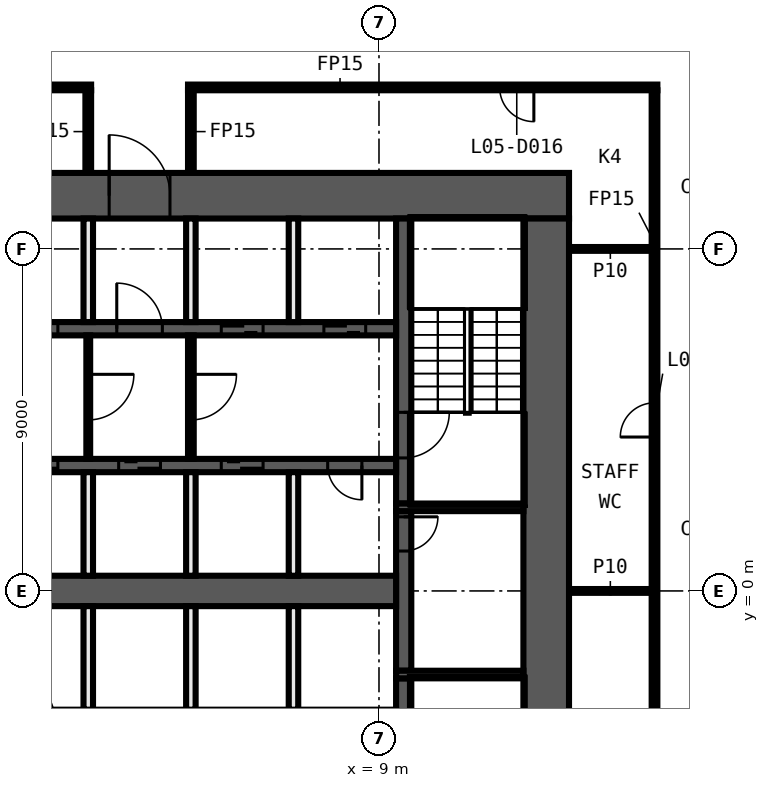
"""IFC4 building model, lengths in metres.
Left out: names, types, materials, properties, quantities, classifications, styles, units other than length and angle.
Written with IfcOpenShell. Run it as: python <this file> out.ifc"""

import sys

from ifc_helpers import new_model, si_unit, direction, frame, frame_2d, origin, place, context, subcontext, project, spatial, rectangle, extrude, element, fill, save


model = new_model("IFC4")
c1 = context("Model", 3, precision=1e-05, world=origin(), true_north=direction((0.0, 1.0)))
c2 = subcontext(c1, "Body", "Model", "MODEL_VIEW")
j1 = project(units=[si_unit("LENGTHUNIT", "METRE"), si_unit("PLANEANGLEUNIT", "RADIAN")], contexts=[c1])
p1 = place(None, origin())
s1 = spatial("IfcSite", under=j1, at=p1, CompositionType="ELEMENT")
p2 = place(p1, origin())
s2 = spatial("IfcBuilding", under=s1, at=p2, CompositionType="ELEMENT")
p3 = place(p2, frame((0.0, 0.0, 38.0)))
s3 = spatial("IfcBuildingStorey", under=s2, at=p3, CompositionType="ELEMENT", Elevation=38.0)
for number, where, z_axis, x_axis in (
    (1, (14.0, 0.0, 0.0), (0.0, 0.0, 1.0), (1.0, 0.0, 0.0)),
    (2, (14.0, 9.0, 0.0), (0.0, 0.0, 1.0), (1.0, 0.0, 0.0)),
):
    element("IfcWall", number, at=place(p3, frame(where, z_axis=z_axis, x_axis=x_axis)), inside=s3, PredefinedType="PARTITIONING", context=c2, shape_type="SweptSolid", body=[
        extrude(rectangle(XDim=2.175, YDim=0.1, at=frame_2d((1.087, 0.0))), origin(), (0.0, 0.0, 1.0), 5.6),
    ])
p4 = place(p3, frame((1.425, 13.25, 0.0), z_axis=(0.0, 0.0, 1.0), x_axis=(-1.0, 0.0, 0.0)))
e3 = element("IfcWall", 3, at=p4, inside=s3, PredefinedType="PARTITIONING", context=c2, shape_type="SweptSolid", body=[
    extrude(rectangle(XDim=17.75, YDim=0.15, at=frame_2d((8.875, 0.0))), origin(), (0.0, 0.0, 1.0), 5.6),
])
p5 = place(p4, frame((5.475, 0.0, 0.0)))
e4 = element("IfcOpeningElement", 4, at=p5, cuts=e3, PredefinedType="OPENING", context=c2, shape_type="SweptSolid", body=[
    extrude(rectangle(XDim=0.9, YDim=2.1, at=frame_2d((0.45, 1.05))), frame((0.0, 0.085, 0.0), z_axis=(0.0, -1.0, 0.0), x_axis=(1.0, 0.0, 0.0)), (0.0, 0.0, 1.0), 0.17),
])
p6 = place(p4, frame((13.6, 0.0, 0.0)))
e5 = element("IfcOpeningElement", 5, at=p6, cuts=e3, PredefinedType="OPENING", context=c2, shape_type="SweptSolid", body=[
    extrude(rectangle(XDim=0.9, YDim=2.1, at=frame_2d((0.45, 1.05))), frame((0.0, 0.085, 0.0), z_axis=(0.0, -1.0, 0.0), x_axis=(1.0, 0.0, 0.0)), (0.0, 0.0, 1.0), 0.17),
])
p7 = place(p3, frame((16.325, 13.25, 0.0), z_axis=(0.0, 0.0, 1.0), x_axis=(-1.0, 0.0, 0.0)))
e6 = element("IfcWall", 6, at=p7, inside=s3, PredefinedType="PARTITIONING", context=c2, shape_type="SweptSolid", body=[
    extrude(rectangle(XDim=12.35, YDim=0.15, at=frame_2d((6.175, 0.0))), origin(), (0.0, 0.0, 1.0), 5.6),
])
p8 = place(p7, frame((3.25, 0.0, 0.0)))
e7 = element("IfcOpeningElement", 7, at=p8, cuts=e6, PredefinedType="OPENING", context=c2, shape_type="SweptSolid", body=[
    extrude(rectangle(XDim=0.9, YDim=2.1, at=frame_2d((0.45, 1.05))), frame((0.0, 0.085, 0.0), z_axis=(0.0, -1.0, 0.0), x_axis=(1.0, 0.0, 0.0)), (0.0, 0.0, 1.0), 0.17),
])
p9 = place(p3, frame((16.25, -13.175, 0.0), z_axis=(0.0, 0.0, 1.0), x_axis=(0.0, 1.0, 0.0)))
e8 = element("IfcWall", 8, at=p9, inside=s3, PredefinedType="PARTITIONING", context=c2, shape_type="SweptSolid", body=[
    extrude(rectangle(XDim=26.35, YDim=0.15, at=frame_2d((13.175, 0.0))), origin(), (0.0, 0.0, 1.0), 5.6),
])
p10 = place(p9, frame((8.225, 0.0, 0.0)))
e9 = element("IfcOpeningElement", 9, at=p10, cuts=e8, PredefinedType="OPENING", context=c2, shape_type="SweptSolid", body=[
    extrude(rectangle(XDim=0.9, YDim=2.1, at=frame_2d((0.45, 1.05))), frame((0.0, 0.085, 0.0), z_axis=(0.0, -1.0, 0.0), x_axis=(1.0, 0.0, 0.0)), (0.0, 0.0, 1.0), 0.17),
])
p11 = place(p9, frame((17.225, 0.0, 0.0)))
e10 = element("IfcOpeningElement", 10, at=p11, cuts=e8, PredefinedType="OPENING", context=c2, shape_type="SweptSolid", body=[
    extrude(rectangle(XDim=0.9, YDim=2.1, at=frame_2d((0.45, 1.05))), frame((0.0, 0.085, 0.0), z_axis=(0.0, -1.0, 0.0), x_axis=(1.0, 0.0, 0.0)), (0.0, 0.0, 1.0), 0.17),
])
for number, where, z_axis, x_axis in (
    (11, (4.05, 11.0, 0.0), (0.0, 0.0, 1.0), (0.0, 1.0, 0.0)),
    (12, (1.35, 11.0, 0.0), (0.0, 0.0, 1.0), (0.0, 1.0, 0.0)),
):
    element("IfcWall", number, at=place(p3, frame(where, z_axis=z_axis, x_axis=x_axis)), inside=s3, PredefinedType="PARTITIONING", context=c2, shape_type="SweptSolid", body=[
        extrude(rectangle(XDim=2.175, YDim=0.15, at=frame_2d((1.087, 0.0))), origin(), (0.0, 0.0, 1.0), 5.6),
    ])
p12 = place(p3, frame((-14.0, 10.4, 0.0), z_axis=(0.0, 0.0, 1.0), x_axis=(1.0, 0.0, 0.0)))
e13 = element("IfcWall", 13, at=p12, inside=s3, PredefinedType="SHEAR", context=c2, shape_type="SweptSolid", body=[
    extrude(rectangle(XDim=28.0, YDim=1.2, at=frame_2d((14.0, 0.0))), origin(), (0.0, 0.0, 1.0), 5.6),
])
p13 = place(p12, frame((15.9, 0.0, 0.0)))
e14 = element("IfcOpeningElement", 14, at=p13, cuts=e13, PredefinedType="OPENING", context=c2, shape_type="SweptSolid", body=[
    extrude(rectangle(XDim=1.6, YDim=2.1, at=frame_2d((0.8, 1.05))), frame((0.0, 0.61, 0.0), z_axis=(0.0, -1.0, 0.0), x_axis=(1.0, 0.0, 0.0)), (0.0, 0.0, 1.0), 1.22),
])
p14 = place(p3, frame((13.4, 9.8, 0.0), z_axis=(0.0, 0.0, 1.0), x_axis=(0.0, -1.0, 0.0)))
e15 = element("IfcWall", 15, at=p14, inside=s3, PredefinedType="SHEAR", context=c2, shape_type="SweptSolid", body=[
    extrude(rectangle(XDim=19.6, YDim=1.2, at=frame_2d((9.8, 0.0))), origin(), (0.0, 0.0, 1.0), 5.6),
])
p15 = place(p3, frame((9.65, -2.3, 0.0), z_axis=(0.0, 0.0, 1.0), x_axis=(0.0, -1.0, 0.0)))
e16 = element("IfcWall", 16, at=p15, inside=s3, PredefinedType="SHEAR", context=c2, shape_type="SweptSolid", body=[
    extrude(rectangle(XDim=7.5, YDim=0.4, at=frame_2d((3.75, 0.0))), origin(), (0.0, 0.0, 1.0), 5.6),
])
p16 = place(p15, frame((1.2, 0.0, 0.0)))
e17 = element("IfcOpeningElement", 17, at=p16, cuts=e16, PredefinedType="OPENING", context=c2, shape_type="SweptSolid", body=[
    extrude(rectangle(XDim=1.2, YDim=2.1, at=frame_2d((0.6, 1.05))), frame((0.0, 0.21, 0.0), z_axis=(0.0, -1.0, 0.0), x_axis=(1.0, 0.0, 0.0)), (0.0, 0.0, 1.0), 0.42),
])
p17 = place(p3, frame((9.65, 2.1, 0.0), z_axis=(0.0, 0.0, 1.0), x_axis=(0.0, -1.0, 0.0)))
e18 = element("IfcWall", 18, at=p17, inside=s3, PredefinedType="SHEAR", context=c2, shape_type="SweptSolid", body=[
    extrude(rectangle(XDim=4.2, YDim=0.4, at=frame_2d((2.1, 0.0))), origin(), (0.0, 0.0, 1.0), 5.6),
])
p18 = place(p17, frame((0.15, 0.0, 0.0)))
e19 = element("IfcOpeningElement", 19, at=p18, cuts=e18, PredefinedType="OPENING", context=c2, shape_type="SweptSolid", body=[
    extrude(rectangle(XDim=0.9, YDim=2.1, at=frame_2d((0.45, 1.05))), frame((0.0, 0.21, 0.0), z_axis=(0.0, -1.0, 0.0), x_axis=(1.0, 0.0, 0.0)), (0.0, 0.0, 1.0), 0.42),
])
p19 = place(p3, frame((9.65, 9.8, 0.0), z_axis=(0.0, 0.0, 1.0), x_axis=(0.0, -1.0, 0.0)))
e20 = element("IfcWall", 20, at=p19, inside=s3, PredefinedType="SHEAR", context=c2, shape_type="SweptSolid", body=[
    extrude(rectangle(XDim=7.5, YDim=0.4, at=frame_2d((3.75, 0.0))), origin(), (0.0, 0.0, 1.0), 5.6),
])
p20 = place(p19, frame((5.1, 0.0, 0.0)))
e21 = element("IfcOpeningElement", 21, at=p20, cuts=e20, PredefinedType="OPENING", context=c2, shape_type="SweptSolid", body=[
    extrude(rectangle(XDim=1.2, YDim=2.1, at=frame_2d((0.6, 1.05))), frame((0.0, 0.21, 0.0), z_axis=(0.0, -1.0, 0.0), x_axis=(1.0, 0.0, 0.0)), (0.0, 0.0, 1.0), 0.42),
])
for number, where, z_axis, x_axis in (
    (22, (9.45, 2.2, 0.0), (0.0, 0.0, 1.0), (1.0, 0.0, 0.0)),
    (23, (9.45, -2.2, 0.0), (0.0, 0.0, 1.0), (1.0, 0.0, 0.0)),
):
    element("IfcWall", number, at=place(p3, frame(where, z_axis=z_axis, x_axis=x_axis)), inside=s3, PredefinedType="SHEAR", context=c2, shape_type="SweptSolid", body=[
        extrude(rectangle(XDim=3.35, YDim=0.2, at=frame_2d((1.675, 0.0))), origin(), (0.0, 0.0, 1.0), 5.6),
    ])
p21 = place(p3, frame((-9.45, 6.9, 0.0), z_axis=(0.0, 0.0, 1.0), x_axis=(1.0, 0.0, 0.0)))
e24 = element("IfcWall", 24, at=p21, inside=s3, PredefinedType="SHEAR", context=c2, shape_type="SweptSolid", body=[
    extrude(rectangle(XDim=18.9, YDim=0.35, at=frame_2d((9.45, 0.0))), origin(), (0.0, 0.0, 1.0), 5.6),
])
p22 = place(p21, frame((0.8, 0.0, 0.0)))
e25 = element("IfcOpeningElement", 25, at=p22, cuts=e24, PredefinedType="OPENING", context=c2, shape_type="SweptSolid", body=[
    extrude(rectangle(XDim=1.1, YDim=2.1, at=frame_2d((0.55, 1.05))), frame((0.0, 0.185, 0.0), z_axis=(0.0, -1.0, 0.0), x_axis=(1.0, 0.0, 0.0)), (0.0, 0.0, 1.0), 0.37),
])
p23 = place(p21, frame((3.5, 0.0, 0.0)))
e26 = element("IfcOpeningElement", 26, at=p23, cuts=e24, PredefinedType="OPENING", context=c2, shape_type="SweptSolid", body=[
    extrude(rectangle(XDim=1.1, YDim=2.1, at=frame_2d((0.55, 1.05))), frame((0.0, 0.185, 0.0), z_axis=(0.0, -1.0, 0.0), x_axis=(1.0, 0.0, 0.0)), (0.0, 0.0, 1.0), 0.37),
])
p24 = place(p21, frame((6.2, 0.0, 0.0)))
e27 = element("IfcOpeningElement", 27, at=p24, cuts=e24, PredefinedType="OPENING", context=c2, shape_type="SweptSolid", body=[
    extrude(rectangle(XDim=1.1, YDim=2.1, at=frame_2d((0.55, 1.05))), frame((0.0, 0.185, 0.0), z_axis=(0.0, -1.0, 0.0), x_axis=(1.0, 0.0, 0.0)), (0.0, 0.0, 1.0), 0.37),
])
p25 = place(p21, frame((8.9, 0.0, 0.0)))
e28 = element("IfcOpeningElement", 28, at=p25, cuts=e24, PredefinedType="OPENING", context=c2, shape_type="SweptSolid", body=[
    extrude(rectangle(XDim=1.1, YDim=2.1, at=frame_2d((0.55, 1.05))), frame((0.0, 0.185, 0.0), z_axis=(0.0, -1.0, 0.0), x_axis=(1.0, 0.0, 0.0)), (0.0, 0.0, 1.0), 0.37),
])
p26 = place(p21, frame((11.55, 0.0, 0.0)))
e29 = element("IfcOpeningElement", 29, at=p26, cuts=e24, PredefinedType="OPENING", context=c2, shape_type="SweptSolid", body=[
    extrude(rectangle(XDim=1.2, YDim=2.1, at=frame_2d((0.6, 1.05))), frame((0.0, 0.185, 0.0), z_axis=(0.0, -1.0, 0.0), x_axis=(1.0, 0.0, 0.0)), (0.0, 0.0, 1.0), 0.37),
])
p27 = place(p21, frame((14.3, 0.0, 0.0)))
e30 = element("IfcOpeningElement", 30, at=p27, cuts=e24, PredefinedType="OPENING", context=c2, shape_type="SweptSolid", body=[
    extrude(rectangle(XDim=1.1, YDim=2.1, at=frame_2d((0.55, 1.05))), frame((0.0, 0.185, 0.0), z_axis=(0.0, -1.0, 0.0), x_axis=(1.0, 0.0, 0.0)), (0.0, 0.0, 1.0), 0.37),
])
p28 = place(p21, frame((17.0, 0.0, 0.0)))
e31 = element("IfcOpeningElement", 31, at=p28, cuts=e24, PredefinedType="OPENING", context=c2, shape_type="SweptSolid", body=[
    extrude(rectangle(XDim=1.1, YDim=2.1, at=frame_2d((0.55, 1.05))), frame((0.0, 0.185, 0.0), z_axis=(0.0, -1.0, 0.0), x_axis=(1.0, 0.0, 0.0)), (0.0, 0.0, 1.0), 0.37),
])
p29 = place(p3, frame((9.45, 3.3, 0.0), z_axis=(0.0, 0.0, 1.0), x_axis=(-1.0, 0.0, 0.0)))
e32 = element("IfcWall", 32, at=p29, inside=s3, PredefinedType="SHEAR", context=c2, shape_type="SweptSolid", body=[
    extrude(rectangle(XDim=18.9, YDim=0.35, at=frame_2d((9.45, 0.0))), origin(), (0.0, 0.0, 1.0), 5.6),
])
p30 = place(p29, frame((17.0, 0.0, 0.0)))
e33 = element("IfcOpeningElement", 33, at=p30, cuts=e32, PredefinedType="OPENING", context=c2, shape_type="SweptSolid", body=[
    extrude(rectangle(XDim=1.1, YDim=2.1, at=frame_2d((0.55, 1.05))), frame((0.0, 0.185, 0.0), z_axis=(0.0, -1.0, 0.0), x_axis=(1.0, 0.0, 0.0)), (0.0, 0.0, 1.0), 0.37),
])
p31 = place(p29, frame((14.3, 0.0, 0.0)))
e34 = element("IfcOpeningElement", 34, at=p31, cuts=e32, PredefinedType="OPENING", context=c2, shape_type="SweptSolid", body=[
    extrude(rectangle(XDim=1.1, YDim=2.1, at=frame_2d((0.55, 1.05))), frame((0.0, 0.185, 0.0), z_axis=(0.0, -1.0, 0.0), x_axis=(1.0, 0.0, 0.0)), (0.0, 0.0, 1.0), 0.37),
])
p32 = place(p29, frame((11.6, 0.0, 0.0)))
e35 = element("IfcOpeningElement", 35, at=p32, cuts=e32, PredefinedType="OPENING", context=c2, shape_type="SweptSolid", body=[
    extrude(rectangle(XDim=1.1, YDim=2.1, at=frame_2d((0.55, 1.05))), frame((0.0, 0.185, 0.0), z_axis=(0.0, -1.0, 0.0), x_axis=(1.0, 0.0, 0.0)), (0.0, 0.0, 1.0), 0.37),
])
p33 = place(p29, frame((8.9, 0.0, 0.0)))
e36 = element("IfcOpeningElement", 36, at=p33, cuts=e32, PredefinedType="OPENING", context=c2, shape_type="SweptSolid", body=[
    extrude(rectangle(XDim=1.1, YDim=2.1, at=frame_2d((0.55, 1.05))), frame((0.0, 0.185, 0.0), z_axis=(0.0, -1.0, 0.0), x_axis=(1.0, 0.0, 0.0)), (0.0, 0.0, 1.0), 0.37),
])
p34 = place(p29, frame((6.2, 0.0, 0.0)))
e37 = element("IfcOpeningElement", 37, at=p34, cuts=e32, PredefinedType="OPENING", context=c2, shape_type="SweptSolid", body=[
    extrude(rectangle(XDim=1.1, YDim=2.1, at=frame_2d((0.55, 1.05))), frame((0.0, 0.185, 0.0), z_axis=(0.0, -1.0, 0.0), x_axis=(1.0, 0.0, 0.0)), (0.0, 0.0, 1.0), 0.37),
])
p35 = place(p29, frame((3.5, 0.0, 0.0)))
e38 = element("IfcOpeningElement", 38, at=p35, cuts=e32, PredefinedType="OPENING", context=c2, shape_type="SweptSolid", body=[
    extrude(rectangle(XDim=1.1, YDim=2.1, at=frame_2d((0.55, 1.05))), frame((0.0, 0.185, 0.0), z_axis=(0.0, -1.0, 0.0), x_axis=(1.0, 0.0, 0.0)), (0.0, 0.0, 1.0), 0.37),
])
p36 = place(p29, frame((0.9, 0.0, 0.0)))
e39 = element("IfcOpeningElement", 39, at=p36, cuts=e32, PredefinedType="OPENING", context=c2, shape_type="SweptSolid", body=[
    extrude(rectangle(XDim=0.9, YDim=2.1, at=frame_2d((0.45, 1.05))), frame((0.0, 0.185, 0.0), z_axis=(0.0, -1.0, 0.0), x_axis=(1.0, 0.0, 0.0)), (0.0, 0.0, 1.0), 0.37),
])
p37 = place(p3, frame((-9.45, 0.0, 0.0), z_axis=(0.0, 0.0, 1.0), x_axis=(1.0, 0.0, 0.0)))
e40 = element("IfcWall", 40, at=p37, inside=s3, PredefinedType="SHEAR", context=c2, shape_type="SweptSolid", body=[
    extrude(rectangle(XDim=18.9, YDim=0.8, at=frame_2d((9.45, 0.0))), origin(), (0.0, 0.0, 1.0), 5.6),
])
for number, where, z_axis, x_axis in (
    (41, (6.75, -3.125, 0.0), (0.0, 0.0, 1.0), (0.0, 1.0, 0.0)),
    (42, (6.75, 0.4, 0.0), (0.0, 0.0, 1.0), (0.0, 1.0, 0.0)),
    (43, (6.75, 7.075, 0.0), (0.0, 0.0, 1.0), (0.0, 1.0, 0.0)),
):
    element("IfcWall", number, at=place(p3, frame(where, z_axis=z_axis, x_axis=x_axis)), inside=s3, PredefinedType="SOLIDWALL", context=c2, shape_type="SweptSolid", body=[
        extrude(rectangle(XDim=2.725, YDim=0.25, at=frame_2d((1.363, 0.0))), origin(), (0.0, 0.0, 1.0), 5.6),
    ])
p38 = place(p3, frame((4.05, 6.725, 0.0), z_axis=(0.0, 0.0, 1.0), x_axis=(0.0, -1.0, 0.0)))
e44 = element("IfcWall", 44, at=p38, inside=s3, PredefinedType="PARTITIONING", context=c2, shape_type="SweptSolid", body=[
    extrude(rectangle(XDim=3.25, YDim=0.15, at=frame_2d((1.625, 0.0))), origin(), (0.0, 0.0, 1.0), 5.6),
])
p39 = place(p38, frame((1.025, 0.0, 0.0)))
e45 = element("IfcOpeningElement", 45, at=p39, cuts=e44, PredefinedType="OPENING", context=c2, shape_type="SweptSolid", body=[
    extrude(rectangle(XDim=1.2, YDim=2.1, at=frame_2d((0.6, 1.05))), frame((0.0, 0.085, 0.0), z_axis=(0.0, -1.0, 0.0), x_axis=(1.0, 0.0, 0.0)), (0.0, 0.0, 1.0), 0.17),
])
for number, where, z_axis, x_axis in (
    (46, (4.05, -3.125, 0.0), (0.0, 0.0, 1.0), (0.0, 1.0, 0.0)),
    (47, (4.05, 0.4, 0.0), (0.0, 0.0, 1.0), (0.0, 1.0, 0.0)),
    (48, (4.05, 7.075, 0.0), (0.0, 0.0, 1.0), (0.0, 1.0, 0.0)),
):
    element("IfcWall", number, at=place(p3, frame(where, z_axis=z_axis, x_axis=x_axis)), inside=s3, PredefinedType="SOLIDWALL", context=c2, shape_type="SweptSolid", body=[
        extrude(rectangle(XDim=2.725, YDim=0.25, at=frame_2d((1.363, 0.0))), origin(), (0.0, 0.0, 1.0), 5.6),
    ])
p40 = place(p3, frame((1.35, 6.725, 0.0), z_axis=(0.0, 0.0, 1.0), x_axis=(0.0, -1.0, 0.0)))
e49 = element("IfcWall", 49, at=p40, inside=s3, PredefinedType="PARTITIONING", context=c2, shape_type="SweptSolid", body=[
    extrude(rectangle(XDim=3.25, YDim=0.1, at=frame_2d((1.625, 0.0))), origin(), (0.0, 0.0, 1.0), 5.6),
])
p41 = place(p40, frame((1.025, 0.0, 0.0)))
e50 = element("IfcOpeningElement", 50, at=p41, cuts=e49, PredefinedType="OPENING", context=c2, shape_type="SweptSolid", body=[
    extrude(rectangle(XDim=1.2, YDim=2.1, at=frame_2d((0.6, 1.05))), frame((0.0, 0.06, 0.0), z_axis=(0.0, -1.0, 0.0), x_axis=(1.0, 0.0, 0.0)), (0.0, 0.0, 1.0), 0.12),
])
for number, where, z_axis, x_axis in (
    (51, (1.35, -3.125, 0.0), (0.0, 0.0, 1.0), (0.0, 1.0, 0.0)),
    (52, (1.35, 0.4, 0.0), (0.0, 0.0, 1.0), (0.0, 1.0, 0.0)),
    (53, (1.35, 7.075, 0.0), (0.0, 0.0, 1.0), (0.0, 1.0, 0.0)),
):
    element("IfcWall", number, at=place(p3, frame(where, z_axis=z_axis, x_axis=x_axis)), inside=s3, PredefinedType="SOLIDWALL", context=c2, shape_type="SweptSolid", body=[
        extrude(rectangle(XDim=2.725, YDim=0.25, at=frame_2d((1.363, 0.0))), origin(), (0.0, 0.0, 1.0), 5.6),
    ])
p42 = place(p11, origin())
e54 = element("IfcDoor", 54, at=p42, inside=s3, OperationType="SINGLE_SWING_RIGHT", PredefinedType="DOOR", context=c2, shape_type="SweptSolid", body=[
    extrude(rectangle(XDim=0.9, YDim=2.1, at=frame_2d((0.45, 1.05))), frame((0.0, 0.025, 0.0), z_axis=(0.0, -1.0, 0.0), x_axis=(1.0, 0.0, 0.0)), (0.0, 0.0, 1.0), 0.05),
])
fill(e10, e54)
p43 = place(p8, origin())
e55 = element("IfcDoor", 55, at=p43, inside=s3, OperationType="SINGLE_SWING_LEFT", PredefinedType="DOOR", context=c2, shape_type="SweptSolid", body=[
    extrude(rectangle(XDim=0.9, YDim=2.1, at=frame_2d((0.45, 1.05))), frame((0.0, 0.025, 0.0), z_axis=(0.0, -1.0, 0.0), x_axis=(1.0, 0.0, 0.0)), (0.0, 0.0, 1.0), 0.05),
])
fill(e7, e55)
p44 = place(p18, origin())
e56 = element("IfcDoor", 56, at=p44, inside=s3, OperationType="SINGLE_SWING_RIGHT", PredefinedType="DOOR", context=c2, shape_type="SweptSolid", body=[
    extrude(rectangle(XDim=0.9, YDim=2.1, at=frame_2d((0.45, 1.05))), frame((0.0, 0.025, 0.0), z_axis=(0.0, -1.0, 0.0), x_axis=(1.0, 0.0, 0.0)), (0.0, 0.0, 1.0), 0.05),
])
fill(e19, e56)
p45 = place(p25, origin())
e57 = element("IfcDoor", 57, at=p45, inside=s3, OperationType="DOUBLE_DOOR_SLIDING", PredefinedType="DOOR", context=c2, shape_type="SweptSolid", body=[
    extrude(rectangle(XDim=1.1, YDim=2.1, at=frame_2d((0.55, 1.05))), frame((0.0, 0.025, 0.0), z_axis=(0.0, -1.0, 0.0), x_axis=(1.0, 0.0, 0.0)), (0.0, 0.0, 1.0), 0.05),
])
fill(e28, e57)
p46 = place(p13, origin())
e58 = element("IfcDoor", 58, at=p46, inside=s3, OperationType="DOUBLE_DOOR_SINGLE_SWING", PredefinedType="DOOR", context=c2, shape_type="SweptSolid", body=[
    extrude(rectangle(XDim=1.6, YDim=2.1, at=frame_2d((0.8, 1.05))), frame((0.0, 0.025, 0.0), z_axis=(0.0, -1.0, 0.0), x_axis=(1.0, 0.0, 0.0)), (0.0, 0.0, 1.0), 0.05),
])
fill(e14, e58)
p47 = place(p26, origin())
e59 = element("IfcDoor", 59, at=p47, inside=s3, OperationType="SINGLE_SWING_LEFT", PredefinedType="DOOR", context=c2, shape_type="SweptSolid", body=[
    extrude(rectangle(XDim=1.2, YDim=2.1, at=frame_2d((0.6, 1.05))), frame((0.0, 0.025, 0.0), z_axis=(0.0, -1.0, 0.0), x_axis=(1.0, 0.0, 0.0)), (0.0, 0.0, 1.0), 0.05),
])
fill(e29, e59)
p48 = place(p27, origin())
e60 = element("IfcDoor", 60, at=p48, inside=s3, OperationType="DOUBLE_DOOR_SLIDING", PredefinedType="DOOR", context=c2, shape_type="SweptSolid", body=[
    extrude(rectangle(XDim=1.1, YDim=2.1, at=frame_2d((0.55, 1.05))), frame((0.0, 0.025, 0.0), z_axis=(0.0, -1.0, 0.0), x_axis=(1.0, 0.0, 0.0)), (0.0, 0.0, 1.0), 0.05),
])
fill(e30, e60)
p49 = place(p28, origin())
e61 = element("IfcDoor", 61, at=p49, inside=s3, OperationType="DOUBLE_DOOR_SLIDING", PredefinedType="DOOR", context=c2, shape_type="SweptSolid", body=[
    extrude(rectangle(XDim=1.1, YDim=2.1, at=frame_2d((0.55, 1.05))), frame((0.0, 0.025, 0.0), z_axis=(0.0, -1.0, 0.0), x_axis=(1.0, 0.0, 0.0)), (0.0, 0.0, 1.0), 0.05),
])
fill(e31, e61)
p50 = place(p33, origin())
e62 = element("IfcDoor", 62, at=p50, inside=s3, OperationType="DOUBLE_DOOR_SLIDING", PredefinedType="DOOR", context=c2, shape_type="SweptSolid", body=[
    extrude(rectangle(XDim=1.1, YDim=2.1, at=frame_2d((0.55, 1.05))), frame((0.0, 0.025, 0.0), z_axis=(0.0, -1.0, 0.0), x_axis=(1.0, 0.0, 0.0)), (0.0, 0.0, 1.0), 0.05),
])
fill(e36, e62)
p51 = place(p34, origin())
e63 = element("IfcDoor", 63, at=p51, inside=s3, OperationType="DOUBLE_DOOR_SLIDING", PredefinedType="DOOR", context=c2, shape_type="SweptSolid", body=[
    extrude(rectangle(XDim=1.1, YDim=2.1, at=frame_2d((0.55, 1.05))), frame((0.0, 0.025, 0.0), z_axis=(0.0, -1.0, 0.0), x_axis=(1.0, 0.0, 0.0)), (0.0, 0.0, 1.0), 0.05),
])
fill(e37, e63)
p52 = place(p35, origin())
e64 = element("IfcDoor", 64, at=p52, inside=s3, OperationType="DOUBLE_DOOR_SLIDING", PredefinedType="DOOR", context=c2, shape_type="SweptSolid", body=[
    extrude(rectangle(XDim=1.1, YDim=2.1, at=frame_2d((0.55, 1.05))), frame((0.0, 0.025, 0.0), z_axis=(0.0, -1.0, 0.0), x_axis=(1.0, 0.0, 0.0)), (0.0, 0.0, 1.0), 0.05),
])
fill(e38, e64)
p53 = place(p36, origin())
e65 = element("IfcDoor", 65, at=p53, inside=s3, OperationType="SINGLE_SWING_LEFT", PredefinedType="DOOR", context=c2, shape_type="SweptSolid", body=[
    extrude(rectangle(XDim=0.9, YDim=2.1, at=frame_2d((0.45, 1.05))), frame((0.0, 0.025, 0.0), z_axis=(0.0, -1.0, 0.0), x_axis=(1.0, 0.0, 0.0)), (0.0, 0.0, 1.0), 0.05),
])
fill(e39, e65)
p54 = place(p20, origin())
e66 = element("IfcDoor", 66, at=p54, inside=s3, OperationType="SINGLE_SWING_LEFT", PredefinedType="DOOR", context=c2, shape_type="SweptSolid", body=[
    extrude(rectangle(XDim=1.2, YDim=2.1, at=frame_2d((0.6, 1.05))), frame((0.0, 0.025, 0.0), z_axis=(0.0, -1.0, 0.0), x_axis=(1.0, 0.0, 0.0)), (0.0, 0.0, 1.0), 0.05),
])
fill(e21, e66)
p55 = place(p41, origin())
e67 = element("IfcDoor", 67, at=p55, inside=s3, OperationType="SINGLE_SWING_LEFT", PredefinedType="DOOR", context=c2, shape_type="SweptSolid", body=[
    extrude(rectangle(XDim=1.2, YDim=2.1, at=frame_2d((0.6, 1.05))), frame((0.0, 0.025, 0.0), z_axis=(0.0, -1.0, 0.0), x_axis=(1.0, 0.0, 0.0)), (0.0, 0.0, 1.0), 0.05),
])
fill(e50, e67)
p56 = place(p39, origin())
e68 = element("IfcDoor", 68, at=p56, inside=s3, OperationType="SINGLE_SWING_RIGHT", PredefinedType="DOOR", context=c2, shape_type="SweptSolid", body=[
    extrude(rectangle(XDim=1.2, YDim=2.1, at=frame_2d((0.6, 1.05))), frame((0.0, 0.025, 0.0), z_axis=(0.0, -1.0, 0.0), x_axis=(1.0, 0.0, 0.0)), (0.0, 0.0, 1.0), 0.05),
])
fill(e45, e68)
save(model, sys.argv[1])
